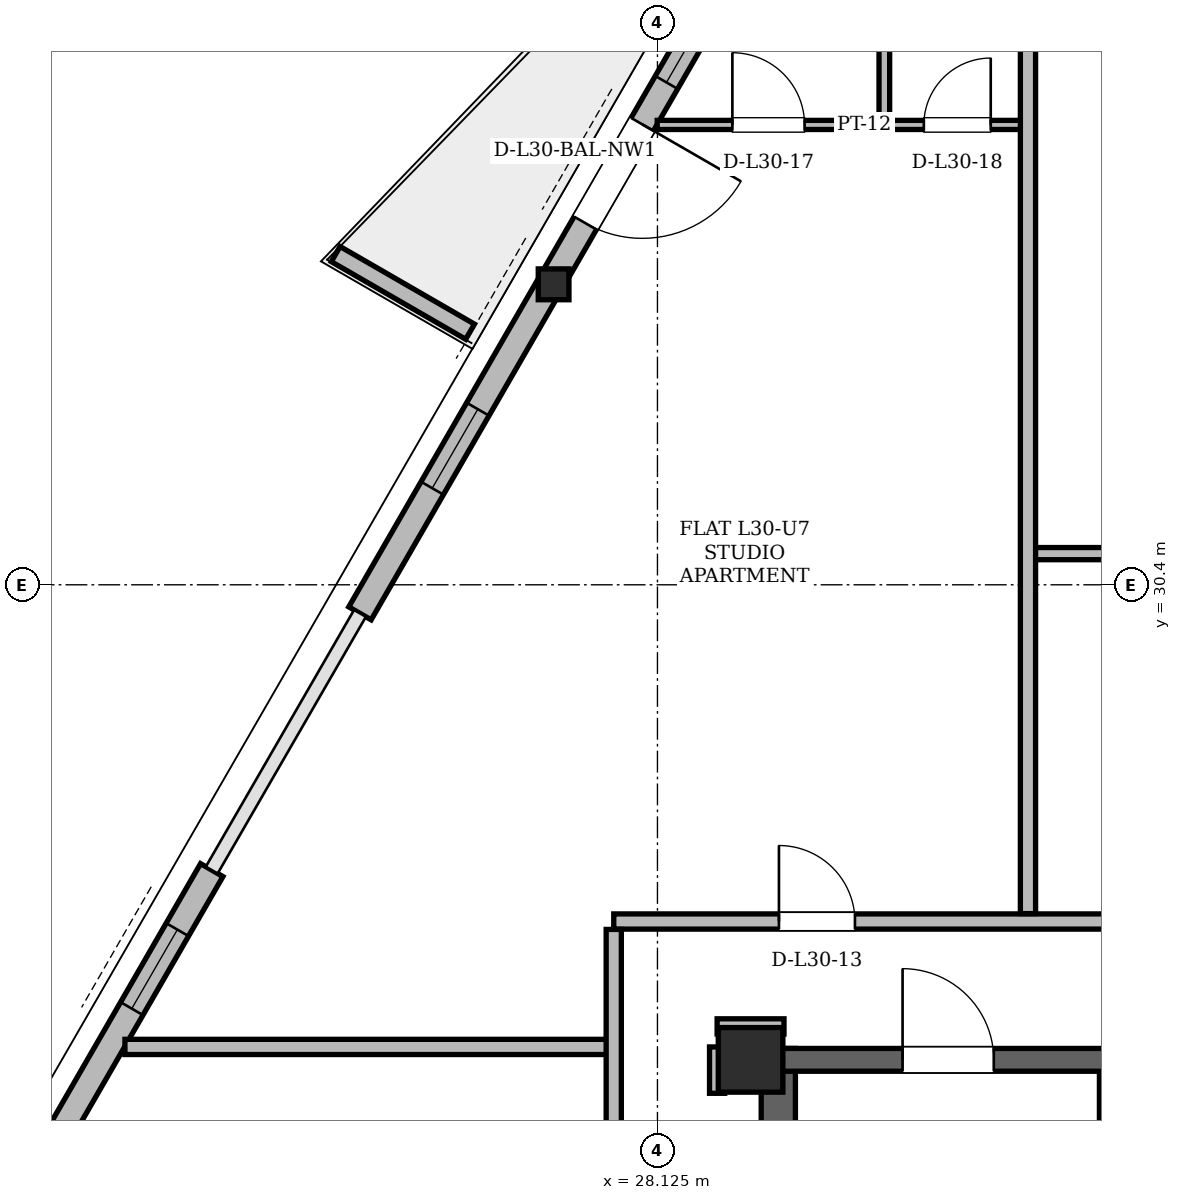
"""IFC4 building model, lengths in metres.
Left out: names, types, materials, properties, quantities, classifications, styles, units other than length and angle.
Written with IfcOpenShell. Run it as: python <this file> out.ifc"""

import sys

from ifc_helpers import new_model, si_unit, direction, frame, frame_2d, origin, origin_2d, place, context, subcontext, project, spatial, polyline, rectangle, hollow_rectangle, i_section, outline, extrude, element, fill, save


model = new_model("IFC4")
c1 = context("Model", 3, precision=1e-05, world=origin(), true_north=direction((0.0, 1.0)))
c2 = subcontext(c1, "Body", "Model", "MODEL_VIEW")
j1 = project(units=[si_unit("LENGTHUNIT", "METRE"), si_unit("PLANEANGLEUNIT", "RADIAN")], contexts=[c1])
p1 = place(None, origin())
s1 = spatial("IfcSite", under=j1, at=p1, CompositionType="ELEMENT")
p2 = place(p1, origin())
s2 = spatial("IfcBuilding", under=s1, at=p2, CompositionType="ELEMENT")
p3 = place(p2, frame((0.0, 0.0, 115.8)))
s3 = spatial("IfcBuildingStorey", under=s2, at=p3, CompositionType="ELEMENT", Elevation=115.8)
p4 = place(p3, frame((29.35, 24.15, 0.0), z_axis=(0.0, 0.0, 1.0), x_axis=(1.0, 0.0, 0.0)))
e1 = element("IfcColumn", 1, at=p4, inside=s3, PredefinedType="COLUMN", context=c2, shape_type="SweptSolid", body=[
    extrude(hollow_rectangle(XDim=0.85, YDim=0.85, WallThickness=0.07, at=origin_2d()), origin(), (0.0, 0.0, 1.0), 3.6),
])
p5 = place(p3, frame((26.719, 34.367, 0.004), z_axis=(0.022293001186, -0.008088009577, 0.999718763553), x_axis=(0.341052623306, 0.940044205416, 0.0)))
e2 = element("IfcColumn", 2, at=p5, inside=s3, PredefinedType="COLUMN", context=c2, shape_type="SweptSolid", body=[
    extrude(i_section(OverallWidth=0.404, OverallDepth=0.406, WebThickness=0.027, FlangeThickness=0.044, at=origin_2d()), origin(), (0.0, 0.0, 1.0), 3.592),
])
p6 = place(p3, frame((29.715, 11.0, 0.0), z_axis=(0.0, 0.0, 1.0), x_axis=(0.0, 1.0, 0.0)))
e3 = element("IfcWall", 3, at=p6, inside=s3, PredefinedType="SHEAR", context=c2, shape_type="SweptSolid", body=[
    extrude(rectangle(XDim=13.3, YDim=0.45, at=frame_2d((6.65, 0.0))), origin(), (0.0, 0.0, 1.0), 3.36),
])
p7 = place(p3, frame((29.65, 24.15, 0.0), z_axis=(0.0, 0.0, 1.0), x_axis=(1.0, 0.0, 0.0)))
e4 = element("IfcWall", 4, at=p7, inside=s3, PredefinedType="SHEAR", context=c2, shape_type="SweptSolid", body=[
    extrude(rectangle(XDim=15.7, YDim=0.3, at=frame_2d((7.85, 0.0))), origin(), (0.0, 0.0, 1.0), 3.36),
])
p8 = place(p7, frame((1.7, 0.0, 0.0)))
e5 = element("IfcOpeningElement", 5, at=p8, cuts=e4, PredefinedType="OPENING", context=c2, shape_type="SweptSolid", body=[
    extrude(rectangle(XDim=1.2, YDim=2.2, at=frame_2d((0.6, 1.1))), frame((0.0, 0.15, 0.0), z_axis=(0.0, -1.0, 0.0), x_axis=(1.0, 0.0, 0.0)), (0.0, 0.0, 1.0), 0.3),
])
p9 = place(p7, frame((12.8, 0.0, 0.0)))
e6 = element("IfcOpeningElement", 6, at=p9, cuts=e4, PredefinedType="OPENING", context=c2, shape_type="SweptSolid", body=[
    extrude(rectangle(XDim=1.2, YDim=2.2, at=frame_2d((0.6, 1.1))), frame((0.0, 0.15, 0.0), z_axis=(0.0, -1.0, 0.0), x_axis=(1.0, 0.0, 0.0)), (0.0, 0.0, 1.0), 0.3),
])
p10 = place(p7, frame((6.55, 0.0, 0.0)))
e7 = element("IfcOpeningElement", 7, at=p10, cuts=e4, PredefinedType="OPENING", context=c2, shape_type="SweptSolid", body=[
    extrude(rectangle(XDim=0.9, YDim=2.05, at=frame_2d((0.45, 1.025))), frame((0.0, 0.15, 0.0), z_axis=(0.0, -1.0, 0.0), x_axis=(1.0, 0.0, 0.0)), (0.0, 0.0, 1.0), 0.3),
])
p11 = place(p7, frame((8.45, 0.0, 0.0)))
e8 = element("IfcOpeningElement", 8, at=p11, cuts=e4, PredefinedType="OPENING", context=c2, shape_type="SweptSolid", body=[
    extrude(rectangle(XDim=0.9, YDim=2.05, at=frame_2d((0.45, 1.025))), frame((0.0, 0.15, 0.0), z_axis=(0.0, -1.0, 0.0), x_axis=(1.0, 0.0, 0.0)), (0.0, 0.0, 1.0), 0.3),
])
p12 = place(p3, frame((31.942, 43.416, 0.0), z_axis=(0.0, 0.0, 1.0), x_axis=(-0.499997162583, -0.866027041962, 0.0)))
e9 = element("IfcWall", 9, at=p12, inside=s3, PredefinedType="SOLIDWALL", context=c2, shape_type="SweptSolid", body=[
    extrude(rectangle(XDim=15.463, YDim=0.34, at=frame_2d((7.731, 0.0))), origin(), (0.0, 0.0, 1.0), 2.578),
])
p13 = place(p12, frame((8.034, 0.0, 0.0)))
e10 = element("IfcOpeningElement", 10, at=p13, cuts=e9, PredefinedType="OPENING", context=c2, shape_type="SweptSolid", body=[
    extrude(rectangle(XDim=1.5, YDim=2.2, at=frame_2d((0.75, 1.1))), frame((0.0, 0.17, 0.0), z_axis=(0.0, -1.0, 0.0), x_axis=(1.0, 0.0, 0.0)), (0.0, 0.0, 1.0), 0.34),
])
p14 = place(p12, frame((12.362, 0.0, 0.85)))
e11 = element("IfcOpeningElement", 11, at=p14, cuts=e9, PredefinedType="OPENING", context=c2, shape_type="SweptSolid", body=[
    extrude(rectangle(XDim=1.2, YDim=1.48, at=frame_2d((0.6, 0.74))), frame((0.0, 0.17, 0.0), z_axis=(0.0, -1.0, 0.0), x_axis=(1.0, 0.0, 0.0)), (0.0, 0.0, 1.0), 0.34),
])
p15 = place(p12, frame((2.931, 0.0, 0.85)))
e12 = element("IfcOpeningElement", 12, at=p15, cuts=e9, PredefinedType="OPENING", context=c2, shape_type="SweptSolid", body=[
    extrude(rectangle(XDim=1.6, YDim=1.618, at=frame_2d((0.8, 0.809))), frame((0.0, 0.17, 0.0), z_axis=(0.0, -1.0, 0.0), x_axis=(1.0, 0.0, 0.0)), (0.0, 0.0, 1.0), 0.34),
])
p16 = place(p12, frame((6.198, 0.0, 0.85)))
e13 = element("IfcOpeningElement", 13, at=p16, cuts=e9, PredefinedType="OPENING", context=c2, shape_type="SweptSolid", body=[
    extrude(rectangle(XDim=1.2, YDim=1.48, at=frame_2d((0.6, 0.74))), frame((0.0, 0.17, 0.0), z_axis=(0.0, -1.0, 0.0), x_axis=(1.0, 0.0, 0.0)), (0.0, 0.0, 1.0), 0.34),
])
p17 = place(p3, frame((22.261, 26.646, 0.0), z_axis=(0.0, 0.0, 1.0), x_axis=(-0.500009004027, -0.866020205245, 0.0)))
e14 = element("IfcWall", 14, at=p17, inside=s3, PredefinedType="SOLIDWALL", context=c2, shape_type="SweptSolid", body=[
    extrude(rectangle(XDim=15.463, YDim=0.34, at=frame_2d((7.731, 0.0))), origin(), (0.0, 0.0, 1.0), 2.578),
])
p18 = place(p17, frame((7.594, 0.0, 0.0)))
e15 = element("IfcOpeningElement", 15, at=p18, cuts=e14, PredefinedType="OPENING", context=c2, shape_type="SweptSolid", body=[
    extrude(rectangle(XDim=1.5, YDim=2.2, at=frame_2d((0.75, 1.1))), frame((0.0, 0.17, 0.0), z_axis=(0.0, -1.0, 0.0), x_axis=(1.0, 0.0, 0.0)), (0.0, 0.0, 1.0), 0.34),
])
p19 = place(p17, frame((13.177, 0.0, 0.85)))
e16 = element("IfcOpeningElement", 16, at=p19, cuts=e14, PredefinedType="OPENING", context=c2, shape_type="SweptSolid", body=[
    extrude(rectangle(XDim=1.2, YDim=1.48, at=frame_2d((0.6, 0.74))), frame((0.0, 0.17, 0.0), z_axis=(0.0, -1.0, 0.0), x_axis=(1.0, 0.0, 0.0)), (0.0, 0.0, 1.0), 0.34),
])
p20 = place(p17, frame((0.905, 0.0, 0.85)))
e17 = element("IfcOpeningElement", 17, at=p20, cuts=e14, PredefinedType="OPENING", context=c2, shape_type="SweptSolid", body=[
    extrude(rectangle(XDim=1.2, YDim=1.48, at=frame_2d((0.6, 0.74))), frame((0.0, 0.17, 0.0), z_axis=(0.0, -1.0, 0.0), x_axis=(1.0, 0.0, 0.0)), (0.0, 0.0, 1.0), 0.34),
])
p21 = place(p3, frame((25.66, 33.73, 0.0), z_axis=(0.0, 0.0, 1.0), x_axis=(-0.866012356593, 0.500022597718, 0.0)))
e18 = element("IfcWall", 18, at=p21, inside=s3, PredefinedType="PARAPET", context=c2, shape_type="SweptSolid", body=[
    extrude(outline(polyline([(0.0, 0.0), (2.042, 0.0), (2.042, 1.1), (0.0, 1.32), (0.0, 0.0)])), frame((0.0, 0.115, 0.0), z_axis=(0.0, -1.0, 0.0), x_axis=(1.0, 0.0, 0.0)), (0.0, 0.0, 1.0), 0.23),
])
p22 = place(p3, frame((34.04, 19.48, 0.0), z_axis=(0.0, 0.0, 1.0), x_axis=(0.0, 1.0, 0.0)))
e19 = element("IfcWall", 19, at=p22, inside=s3, PredefinedType="PARTITIONING", context=c2, shape_type="SweptSolid", body=[
    extrude(rectangle(XDim=4.5, YDim=0.2, at=frame_2d((2.25, 0.0))), origin(), (0.0, 0.0, 1.0), 2.4),
])
p23 = place(p22, frame((2.12, 0.0, 0.0)))
e20 = element("IfcOpeningElement", 20, at=p23, cuts=e19, PredefinedType="OPENING", context=c2, shape_type="SweptSolid", body=[
    extrude(rectangle(XDim=1.1, YDim=2.2, at=frame_2d((0.55, 1.1))), frame((0.0, 0.1, 0.0), z_axis=(0.0, -1.0, 0.0), x_axis=(1.0, 0.0, 0.0)), (0.0, 0.0, 1.0), 0.2),
])
p24 = place(p3, frame((21.119, 24.32, 0.0), z_axis=(0.0, 0.0, 1.0), x_axis=(1.0, 0.0, 0.0)))
e21 = element("IfcWall", 21, at=p24, inside=s3, PredefinedType="PARTITIONING", context=c2, shape_type="SweptSolid", body=[
    extrude(rectangle(XDim=6.431, YDim=0.2, at=frame_2d((3.216, 0.0))), origin(), (0.0, 0.0, 1.0), 3.36),
])
p25 = place(p3, frame((28.91, 24.59, 0.0), z_axis=(0.0, 0.0, 1.0), x_axis=(1.0, 0.0, 0.0)))
e22 = element("IfcWall", 22, at=p25, inside=s3, PredefinedType="PARTITIONING", context=c2, shape_type="SweptSolid", body=[
    extrude(rectangle(XDim=0.88, YDim=0.2, at=frame_2d((0.44, 0.0))), origin(), (0.0, 0.0, 1.0), 2.814),
])
p26 = place(p3, frame((27.55, 25.97, 0.0), z_axis=(0.0, 0.0, 1.0), x_axis=(1.0, 0.0, 0.0)))
e23 = element("IfcWall", 23, at=p26, inside=s3, PredefinedType="PARTITIONING", context=c2, shape_type="SweptSolid", body=[
    extrude(rectangle(XDim=9.15, YDim=0.2, at=frame_2d((4.575, 0.0))), origin(), (0.0, 0.0, 1.0), 2.814),
])
p27 = place(p26, frame((2.173, 0.0, 0.0)))
e24 = element("IfcOpeningElement", 24, at=p27, cuts=e23, PredefinedType="OPENING", context=c2, shape_type="SweptSolid", body=[
    extrude(rectangle(XDim=1.0, YDim=2.18, at=frame_2d((0.5, 1.09))), frame((0.0, 0.1, 0.0), z_axis=(0.0, -1.0, 0.0), x_axis=(1.0, 0.0, 0.0)), (0.0, 0.0, 1.0), 0.2),
])
p28 = place(p3, frame((32.918, 30.81, 0.0), z_axis=(0.0, 0.0, 1.0), x_axis=(1.0, 0.0, 0.0)))
e25 = element("IfcWall", 25, at=p28, inside=s3, PredefinedType="PARTITIONING", context=c2, shape_type="SweptSolid", body=[
    extrude(rectangle(XDim=3.864, YDim=0.16, at=frame_2d((1.932, 0.0))), origin(), (0.0, 0.0, 1.0), 3.36),
])
p29 = place(p28, frame((1.492, 0.0, 0.0)))
e26 = element("IfcOpeningElement", 26, at=p29, cuts=e25, PredefinedType="OPENING", context=c2, shape_type="SweptSolid", body=[
    extrude(rectangle(XDim=0.88, YDim=2.08, at=frame_2d((0.44, 1.04))), frame((0.0, 0.08, 0.0), z_axis=(0.0, -1.0, 0.0), x_axis=(1.0, 0.0, 0.0)), (0.0, 0.0, 1.0), 0.16),
])
p30 = place(p3, frame((28.122, 36.45, 0.0), z_axis=(0.0, 0.0, 1.0), x_axis=(1.0, 0.0, 0.0)))
e27 = element("IfcWall", 27, at=p30, inside=s3, PredefinedType="PARTITIONING", context=c2, shape_type="SweptSolid", body=[
    extrude(rectangle(XDim=4.928, YDim=0.12, at=frame_2d((2.464, 0.0))), origin(), (0.0, 0.0, 1.0), 2.814),
])
p31 = place(p30, frame((0.989, 0.0, 0.0)))
e28 = element("IfcOpeningElement", 28, at=p31, cuts=e27, PredefinedType="OPENING", context=c2, shape_type="SweptSolid", body=[
    extrude(rectangle(XDim=0.95, YDim=2.1, at=frame_2d((0.475, 1.05))), frame((0.0, 0.06, 0.0), z_axis=(0.0, -1.0, 0.0), x_axis=(1.0, 0.0, 0.0)), (0.0, 0.0, 1.0), 0.12),
])
p32 = place(p30, frame((3.508, 0.0, 0.0)))
e29 = element("IfcOpeningElement", 29, at=p32, cuts=e27, PredefinedType="OPENING", context=c2, shape_type="SweptSolid", body=[
    extrude(rectangle(XDim=0.88, YDim=2.08, at=frame_2d((0.44, 1.04))), frame((0.0, 0.06, 0.0), z_axis=(0.0, -1.0, 0.0), x_axis=(1.0, 0.0, 0.0)), (0.0, 0.0, 1.0), 0.12),
])
p33 = place(p3, frame((27.55, 18.554, 0.0), z_axis=(0.0, 0.0, 1.0), x_axis=(0.0, 1.0, 0.0)))
e30 = element("IfcWall", 30, at=p33, inside=s3, PredefinedType="PARTITIONING", context=c2, shape_type="SweptSolid", body=[
    extrude(rectangle(XDim=7.312, YDim=0.2, at=frame_2d((3.656, 0.0))), origin(), (0.0, 0.0, 1.0), 3.36),
])
p34 = place(p3, frame((28.91, 23.71, 0.0), z_axis=(0.0, 0.0, 1.0), x_axis=(0.0, 1.0, 0.0)))
e31 = element("IfcWall", 31, at=p34, inside=s3, PredefinedType="PARTITIONING", context=c2, shape_type="SweptSolid", body=[
    extrude(rectangle(XDim=0.61, YDim=0.2, at=frame_2d((0.305, 0.0))), origin(), (0.0, 0.0, 1.0), 3.36),
])
p35 = place(p3, frame((31.11, 36.514, 0.0), z_axis=(0.0, 0.0, 1.0), x_axis=(0.0, 1.0, 0.0)))
e32 = element("IfcWall", 32, at=p35, inside=s3, PredefinedType="PARTITIONING", context=c2, shape_type="SweptSolid", body=[
    extrude(rectangle(XDim=5.112, YDim=0.14, at=frame_2d((2.556, 0.0))), origin(), (0.0, 0.0, 1.0), 2.578),
])
p36 = place(p3, frame((33.0, 26.074, 0.0), z_axis=(0.0, 0.0, 1.0), x_axis=(0.0, 1.0, 0.0)))
e33 = element("IfcWall", 33, at=p36, inside=s3, PredefinedType="PARTITIONING", context=c2, shape_type="SweptSolid", body=[
    extrude(rectangle(XDim=17.168, YDim=0.2, at=frame_2d((8.584, 0.0))), origin(), (0.0, 0.0, 1.0), 3.36),
])
p37 = place(p13, origin())
e34 = element("IfcDoor", 34, at=p37, inside=s3, OperationType="SINGLE_SWING_LEFT", PredefinedType="DOOR", context=c2, shape_type="SweptSolid", body=[
    extrude(rectangle(XDim=1.5, YDim=2.2, at=frame_2d((0.75, 1.1))), frame((0.0, 0.025, 0.0), z_axis=(0.0, -1.0, 0.0), x_axis=(1.0, 0.0, 0.0)), (0.0, 0.0, 1.0), 0.05),
])
fill(e10, e34)
p38 = place(p14, origin())
e35 = element("IfcWindow", 35, at=p38, inside=s3, PartitioningType="SINGLE_PANEL", PredefinedType="WINDOW", context=c2, shape_type="SweptSolid", body=[
    extrude(rectangle(XDim=1.2, YDim=1.48, at=frame_2d((0.6, 0.74))), frame((0.0, 0.03, 0.0), z_axis=(0.0, -1.0, 0.0), x_axis=(1.0, 0.0, 0.0)), (0.0, 0.0, 1.0), 0.06),
])
fill(e11, e35)
p39 = place(p16, origin())
e36 = element("IfcWindow", 36, at=p39, inside=s3, PartitioningType="SINGLE_PANEL", PredefinedType="WINDOW", context=c2, shape_type="SweptSolid", body=[
    extrude(rectangle(XDim=1.2, YDim=1.48, at=frame_2d((0.6, 0.74))), frame((0.0, 0.03, 0.0), z_axis=(0.0, -1.0, 0.0), x_axis=(1.0, 0.0, 0.0)), (0.0, 0.0, 1.0), 0.06),
])
fill(e13, e36)
p40 = place(p20, origin())
e37 = element("IfcWindow", 37, at=p40, inside=s3, PartitioningType="SINGLE_PANEL", PredefinedType="WINDOW", context=c2, shape_type="SweptSolid", body=[
    extrude(rectangle(XDim=1.2, YDim=1.48, at=frame_2d((0.6, 0.74))), frame((0.0, 0.03, 0.0), z_axis=(0.0, -1.0, 0.0), x_axis=(1.0, 0.0, 0.0)), (0.0, 0.0, 1.0), 0.06),
])
fill(e17, e37)
p41 = place(p8, origin())
e38 = element("IfcDoor", 38, at=p41, inside=s3, OperationType="SINGLE_SWING_LEFT", PredefinedType="DOOR", context=c2, shape_type="SweptSolid", body=[
    extrude(rectangle(XDim=1.2, YDim=2.2, at=frame_2d((0.6, 1.1))), frame((0.0, 0.025, 0.0), z_axis=(0.0, -1.0, 0.0), x_axis=(1.0, 0.0, 0.0)), (0.0, 0.0, 1.0), 0.05),
])
fill(e5, e38)
p42 = place(p27, origin())
e39 = element("IfcDoor", 39, at=p42, inside=s3, OperationType="SINGLE_SWING_LEFT", PredefinedType="DOOR", context=c2, shape_type="SweptSolid", body=[
    extrude(rectangle(XDim=1.0, YDim=2.18, at=frame_2d((0.5, 1.09))), frame((0.0, 0.025, 0.0), z_axis=(0.0, -1.0, 0.0), x_axis=(1.0, 0.0, 0.0)), (0.0, 0.0, 1.0), 0.05),
])
fill(e24, e39)
p43 = place(p31, origin())
e40 = element("IfcDoor", 40, at=p43, inside=s3, OperationType="SINGLE_SWING_LEFT", PredefinedType="DOOR", context=c2, shape_type="SweptSolid", body=[
    extrude(rectangle(XDim=0.95, YDim=2.1, at=frame_2d((0.475, 1.05))), frame((0.0, 0.025, 0.0), z_axis=(0.0, -1.0, 0.0), x_axis=(1.0, 0.0, 0.0)), (0.0, 0.0, 1.0), 0.05),
])
fill(e28, e40)
p44 = place(p32, origin())
e41 = element("IfcDoor", 41, at=p44, inside=s3, OperationType="SINGLE_SWING_RIGHT", PredefinedType="DOOR", context=c2, shape_type="SweptSolid", body=[
    extrude(rectangle(XDim=0.88, YDim=2.08, at=frame_2d((0.44, 1.04))), frame((0.0, 0.025, 0.0), z_axis=(0.0, -1.0, 0.0), x_axis=(1.0, 0.0, 0.0)), (0.0, 0.0, 1.0), 0.05),
])
fill(e29, e41)
save(model, sys.argv[1])
